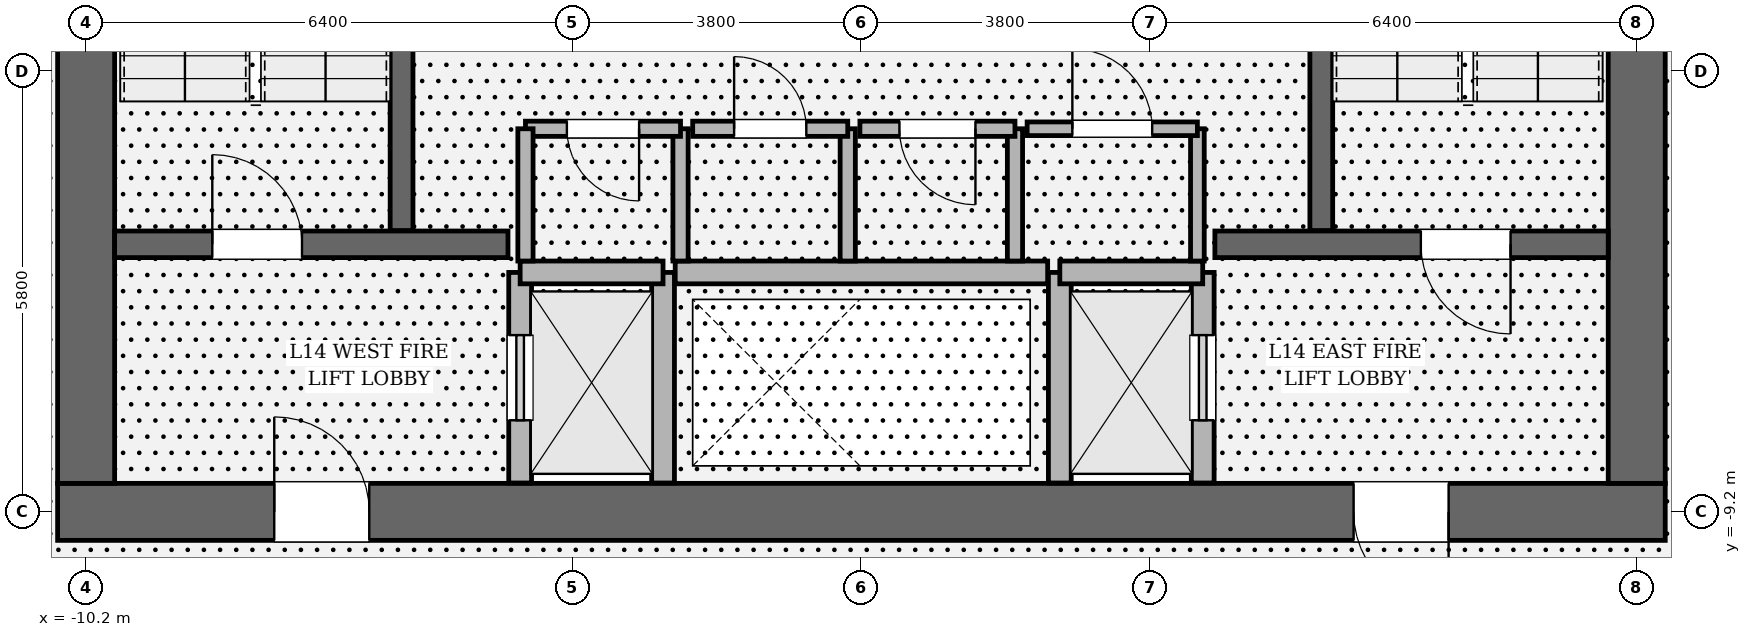
"""IFC4 building model, lengths in metres.
Left out: names, types, materials, properties, quantities, classifications, styles, units other than length and angle.
Written with IfcOpenShell. Run it as: python <this file> out.ifc"""

import sys

from ifc_helpers import new_model, si_unit, direction, frame, frame_2d, origin, place, context, subcontext, project, spatial, rectangle, extrude, element, fill, save


model = new_model("IFC4")
c1 = context("Model", 3, precision=1e-05, world=origin(), true_north=direction((0.0, 1.0)))
c2 = subcontext(c1, "Body", "Model", "MODEL_VIEW")
j1 = project(units=[si_unit("LENGTHUNIT", "METRE"), si_unit("PLANEANGLEUNIT", "RADIAN")], contexts=[c1])
p1 = place(None, origin())
s1 = spatial("IfcSite", under=j1, at=p1, CompositionType="ELEMENT")
p2 = place(p1, origin())
s2 = spatial("IfcBuilding", under=s1, at=p2, CompositionType="ELEMENT")
p3 = place(p2, frame((0.0, 0.0, 64.65)))
s3 = spatial("IfcBuildingStorey", under=s2, at=p3, CompositionType="ELEMENT", Elevation=64.65)
p4 = place(p3, frame((10.575, -9.2, 0.0), z_axis=(0.0, 0.0, 1.0), x_axis=(-1.0, 0.0, 0.0)))
e1 = element("IfcWall", 1, at=p4, inside=s3, PredefinedType="SHEAR", context=c2, shape_type="SweptSolid", body=[
    extrude(rectangle(XDim=21.15, YDim=0.75, at=frame_2d((10.575, 0.0))), origin(), (0.0, 0.0, 1.0), 4.05),
])
p5 = place(p4, frame((2.85, 0.0, 0.0)))
e2 = element("IfcOpeningElement", 2, at=p5, cuts=e1, PredefinedType="OPENING", context=c2, shape_type="SweptSolid", body=[
    extrude(rectangle(XDim=1.25, YDim=2.25, at=frame_2d((0.625, 1.125))), frame((0.0, 0.385, 0.0), z_axis=(0.0, -1.0, 0.0), x_axis=(1.0, 0.0, 0.0)), (0.0, 0.0, 1.0), 0.77),
])
p6 = place(p4, frame((17.05, 0.0, 0.0)))
e3 = element("IfcOpeningElement", 3, at=p6, cuts=e1, PredefinedType="OPENING", context=c2, shape_type="SweptSolid", body=[
    extrude(rectangle(XDim=1.25, YDim=2.25, at=frame_2d((0.625, 1.125))), frame((0.0, 0.385, 0.0), z_axis=(0.0, -1.0, 0.0), x_axis=(1.0, 0.0, 0.0)), (0.0, 0.0, 1.0), 0.77),
])
p7 = place(p3, frame((-10.2, -8.825, 0.0), z_axis=(0.0, 0.0, 1.0), x_axis=(0.0, 1.0, 0.0)))
e4 = element("IfcWall", 4, at=p7, inside=s3, PredefinedType="SHEAR", context=c2, shape_type="SweptSolid", body=[
    extrude(rectangle(XDim=17.65, YDim=0.75, at=frame_2d((8.825, 0.0))), origin(), (0.0, 0.0, 1.0), 4.05),
])
p8 = place(p7, frame((12.615, 0.0, 0.0)))
e5 = element("IfcOpeningElement", 5, at=p8, cuts=e4, PredefinedType="OPENING", context=c2, shape_type="SweptSolid", body=[
    extrude(rectangle(XDim=1.18, YDim=2.2, at=frame_2d((0.59, 1.1))), frame((0.0, 0.385, 0.0), z_axis=(0.0, -1.0, 0.0), x_axis=(1.0, 0.0, 0.0)), (0.0, 0.0, 1.0), 0.77),
])
p9 = place(p3, frame((10.2, 8.825, 0.0), z_axis=(0.0, 0.0, 1.0), x_axis=(0.0, -1.0, 0.0)))
e6 = element("IfcWall", 6, at=p9, inside=s3, PredefinedType="SHEAR", context=c2, shape_type="SweptSolid", body=[
    extrude(rectangle(XDim=17.65, YDim=0.75, at=frame_2d((8.825, 0.0))), origin(), (0.0, 0.0, 1.0), 4.05),
])
p10 = place(p9, frame((3.855, 0.0, 0.0)))
e7 = element("IfcOpeningElement", 7, at=p10, cuts=e6, PredefinedType="OPENING", context=c2, shape_type="SweptSolid", body=[
    extrude(rectangle(XDim=1.18, YDim=2.2, at=frame_2d((0.59, 1.1))), frame((0.0, 0.385, 0.0), z_axis=(0.0, -1.0, 0.0), x_axis=(1.0, 0.0, 0.0)), (0.0, 0.0, 1.0), 0.77),
])
for number, where, z_axis, x_axis in (
    (8, (-6.05, -5.5, 0.0), (0.0, 0.0, 1.0), (0.0, 1.0, 0.0)),
    (9, (6.05, 3.45, 0.0), (0.0, 0.0, 1.0), (0.0, -1.0, 0.0)),
):
    element("IfcWall", number, at=place(p3, frame(where, z_axis=z_axis, x_axis=x_axis)), inside=s3, PredefinedType="SOLIDWALL", context=c2, shape_type="SweptSolid", body=[
        extrude(rectangle(XDim=8.95, YDim=0.3, at=frame_2d((4.475, 0.0))), origin(), (0.0, 0.0, 1.0), 4.05),
    ])
p11 = place(p3, frame((-9.825, -5.68, 0.0), z_axis=(0.0, 0.0, 1.0), x_axis=(1.0, 0.0, 0.0)))
e10 = element("IfcWall", 10, at=p11, inside=s3, PredefinedType="SOLIDWALL", context=c2, shape_type="SweptSolid", body=[
    extrude(rectangle(XDim=5.175, YDim=0.35, at=frame_2d((2.587, 0.0))), origin(), (0.0, 0.0, 1.0), 4.05),
])
p12 = place(p11, frame((1.285, 0.0, 0.0)))
e11 = element("IfcOpeningElement", 11, at=p12, cuts=e10, PredefinedType="OPENING", context=c2, shape_type="SweptSolid", body=[
    extrude(rectangle(XDim=1.18, YDim=2.2, at=frame_2d((0.59, 1.1))), frame((0.0, 0.185, 0.0), z_axis=(0.0, -1.0, 0.0), x_axis=(1.0, 0.0, 0.0)), (0.0, 0.0, 1.0), 0.37),
])
p13 = place(p3, frame((4.65, -5.68, 0.0), z_axis=(0.0, 0.0, 1.0), x_axis=(1.0, 0.0, 0.0)))
e12 = element("IfcWall", 12, at=p13, inside=s3, PredefinedType="SOLIDWALL", context=c2, shape_type="SweptSolid", body=[
    extrude(rectangle(XDim=5.175, YDim=0.35, at=frame_2d((2.587, 0.0))), origin(), (0.0, 0.0, 1.0), 4.05),
])
p14 = place(p13, frame((2.71, 0.0, 0.0)))
e13 = element("IfcOpeningElement", 13, at=p14, cuts=e12, PredefinedType="OPENING", context=c2, shape_type="SweptSolid", body=[
    extrude(rectangle(XDim=1.18, YDim=2.2, at=frame_2d((0.59, 1.1))), frame((0.0, 0.185, 0.0), z_axis=(0.0, -1.0, 0.0), x_axis=(1.0, 0.0, 0.0)), (0.0, 0.0, 1.0), 0.37),
])
p15 = place(p3, frame((-4.49, -8.82, 0.0), z_axis=(0.0, 0.0, 1.0), x_axis=(0.0, 1.0, 0.0)))
e14 = element("IfcWall", 14, at=p15, inside=s3, PredefinedType="SOLIDWALL", context=c2, shape_type="SweptSolid", body=[
    extrude(rectangle(XDim=2.77, YDim=0.3, at=frame_2d((1.385, 0.0))), origin(), (0.0, 0.0, 1.0), 3.81),
])
p16 = place(p15, frame((0.825, 0.0, 0.0)))
e15 = element("IfcOpeningElement", 15, at=p16, cuts=e14, PredefinedType="OPENING", context=c2, shape_type="SweptSolid", body=[
    extrude(rectangle(XDim=1.12, YDim=2.25, at=frame_2d((0.56, 1.125))), frame((0.0, 0.16, 0.0), z_axis=(0.0, -1.0, 0.0), x_axis=(1.0, 0.0, 0.0)), (0.0, 0.0, 1.0), 0.32),
])
p17 = place(p3, frame((-2.61, -8.82, 0.0), z_axis=(0.0, 0.0, 1.0), x_axis=(0.0, 1.0, 0.0)))
e16 = element("IfcWall", 16, at=p17, inside=s3, PredefinedType="SOLIDWALL", context=c2, shape_type="SweptSolid", body=[
    extrude(rectangle(XDim=2.77, YDim=0.3, at=frame_2d((1.385, 0.0))), origin(), (0.0, 0.0, 1.0), 3.81),
])
p18 = place(p3, frame((-4.49, -6.05, 0.0), z_axis=(0.0, 0.0, 1.0), x_axis=(1.0, 0.0, 0.0)))
e17 = element("IfcWall", 17, at=p18, inside=s3, PredefinedType="SOLIDWALL", context=c2, shape_type="SweptSolid", body=[
    extrude(rectangle(XDim=1.88, YDim=0.3, at=frame_2d((0.94, 0.0))), origin(), (0.0, 0.0, 1.0), 3.81),
])
p19 = place(p3, frame((4.49, -8.82, 0.0), z_axis=(0.0, 0.0, 1.0), x_axis=(0.0, 1.0, 0.0)))
e18 = element("IfcWall", 18, at=p19, inside=s3, PredefinedType="SOLIDWALL", context=c2, shape_type="SweptSolid", body=[
    extrude(rectangle(XDim=2.77, YDim=0.3, at=frame_2d((1.385, 0.0))), origin(), (0.0, 0.0, 1.0), 3.81),
])
p20 = place(p19, frame((0.825, 0.0, 0.0)))
e19 = element("IfcOpeningElement", 19, at=p20, cuts=e18, PredefinedType="OPENING", context=c2, shape_type="SweptSolid", body=[
    extrude(rectangle(XDim=1.12, YDim=2.25, at=frame_2d((0.56, 1.125))), frame((0.0, 0.16, 0.0), z_axis=(0.0, -1.0, 0.0), x_axis=(1.0, 0.0, 0.0)), (0.0, 0.0, 1.0), 0.32),
])
p21 = place(p3, frame((2.61, -8.82, 0.0), z_axis=(0.0, 0.0, 1.0), x_axis=(0.0, 1.0, 0.0)))
e20 = element("IfcWall", 20, at=p21, inside=s3, PredefinedType="SOLIDWALL", context=c2, shape_type="SweptSolid", body=[
    extrude(rectangle(XDim=2.77, YDim=0.3, at=frame_2d((1.385, 0.0))), origin(), (0.0, 0.0, 1.0), 3.81),
])
p22 = place(p3, frame((2.61, -6.05, 0.0), z_axis=(0.0, 0.0, 1.0), x_axis=(1.0, 0.0, 0.0)))
e21 = element("IfcWall", 21, at=p22, inside=s3, PredefinedType="SOLIDWALL", context=c2, shape_type="SweptSolid", body=[
    extrude(rectangle(XDim=1.88, YDim=0.3, at=frame_2d((0.94, 0.0))), origin(), (0.0, 0.0, 1.0), 3.81),
])
p23 = place(p3, frame((-2.45, -6.05, 0.0), z_axis=(0.0, 0.0, 1.0), x_axis=(1.0, 0.0, 0.0)))
e22 = element("IfcWall", 22, at=p23, inside=s3, PredefinedType="SOLIDWALL", context=c2, shape_type="SweptSolid", body=[
    extrude(rectangle(XDim=4.9, YDim=0.3, at=frame_2d((2.45, 0.0))), origin(), (0.0, 0.0, 1.0), 3.81),
])
p24 = place(p3, frame((-2.38, -5.9, 0.0), z_axis=(0.0, 0.0, 1.0), x_axis=(0.0, 1.0, 0.0)))
e23 = element("IfcWall", 23, at=p24, inside=s3, PredefinedType="SOLIDWALL", context=c2, shape_type="SweptSolid", body=[
    extrude(rectangle(XDim=1.74, YDim=0.2, at=frame_2d((0.87, 0.0))), origin(), (0.0, 0.0, 1.0), 3.81),
])
p25 = place(p3, frame((-2.38, -4.16, 0.0), z_axis=(0.0, 0.0, 1.0), x_axis=(-1.0, 0.0, 0.0)))
e24 = element("IfcWall", 24, at=p25, inside=s3, PredefinedType="SOLIDWALL", context=c2, shape_type="SweptSolid", body=[
    extrude(rectangle(XDim=2.04, YDim=0.2, at=frame_2d((1.02, 0.0))), origin(), (0.0, 0.0, 1.0), 3.81),
])
p26 = place(p25, frame((0.545, 0.0, 0.0)))
e25 = element("IfcOpeningElement", 25, at=p26, cuts=e24, PredefinedType="OPENING", context=c2, shape_type="SweptSolid", body=[
    extrude(rectangle(XDim=0.95, YDim=2.15, at=frame_2d((0.475, 1.075))), frame((0.0, 0.11, 0.0), z_axis=(0.0, -1.0, 0.0), x_axis=(1.0, 0.0, 0.0)), (0.0, 0.0, 1.0), 0.22),
])
for number, where, z_axis, x_axis in (
    (26, (-4.42, -4.16, 0.0), (0.0, 0.0, 1.0), (0.0, -1.0, 0.0)),
    (27, (-0.18, -5.9, 0.0), (0.0, 0.0, 1.0), (0.0, 1.0, 0.0)),
):
    element("IfcWall", number, at=place(p3, frame(where, z_axis=z_axis, x_axis=x_axis)), inside=s3, PredefinedType="SOLIDWALL", context=c2, shape_type="SweptSolid", body=[
        extrude(rectangle(XDim=1.74, YDim=0.2, at=frame_2d((0.87, 0.0))), origin(), (0.0, 0.0, 1.0), 3.81),
    ])
p27 = place(p3, frame((-0.18, -4.16, 0.0), z_axis=(0.0, 0.0, 1.0), x_axis=(-1.0, 0.0, 0.0)))
e28 = element("IfcWall", 28, at=p27, inside=s3, PredefinedType="SOLIDWALL", context=c2, shape_type="SweptSolid", body=[
    extrude(rectangle(XDim=2.04, YDim=0.2, at=frame_2d((1.02, 0.0))), origin(), (0.0, 0.0, 1.0), 3.81),
])
p28 = place(p27, frame((0.545, 0.0, 0.0)))
e29 = element("IfcOpeningElement", 29, at=p28, cuts=e28, PredefinedType="OPENING", context=c2, shape_type="SweptSolid", body=[
    extrude(rectangle(XDim=0.95, YDim=2.15, at=frame_2d((0.475, 1.075))), frame((0.0, 0.11, 0.0), z_axis=(0.0, -1.0, 0.0), x_axis=(1.0, 0.0, 0.0)), (0.0, 0.0, 1.0), 0.22),
])
p29 = place(p3, frame((2.02, -5.9, 0.0), z_axis=(0.0, 0.0, 1.0), x_axis=(0.0, 1.0, 0.0)))
e30 = element("IfcWall", 30, at=p29, inside=s3, PredefinedType="SOLIDWALL", context=c2, shape_type="SweptSolid", body=[
    extrude(rectangle(XDim=1.74, YDim=0.2, at=frame_2d((0.87, 0.0))), origin(), (0.0, 0.0, 1.0), 3.81),
])
p30 = place(p3, frame((2.02, -4.16, 0.0), z_axis=(0.0, 0.0, 1.0), x_axis=(-1.0, 0.0, 0.0)))
e31 = element("IfcWall", 31, at=p30, inside=s3, PredefinedType="SOLIDWALL", context=c2, shape_type="SweptSolid", body=[
    extrude(rectangle(XDim=2.04, YDim=0.2, at=frame_2d((1.02, 0.0))), origin(), (0.0, 0.0, 1.0), 3.81),
])
p31 = place(p30, frame((0.52, 0.0, 0.0)))
e32 = element("IfcOpeningElement", 32, at=p31, cuts=e31, PredefinedType="OPENING", context=c2, shape_type="SweptSolid", body=[
    extrude(rectangle(XDim=1.0, YDim=2.15, at=frame_2d((0.5, 1.075))), frame((0.0, 0.11, 0.0), z_axis=(0.0, -1.0, 0.0), x_axis=(1.0, 0.0, 0.0)), (0.0, 0.0, 1.0), 0.22),
])
p32 = place(p3, frame((4.42, -5.9, 0.0), z_axis=(0.0, 0.0, 1.0), x_axis=(0.0, 1.0, 0.0)))
e33 = element("IfcWall", 33, at=p32, inside=s3, PredefinedType="PARTITIONING", context=c2, shape_type="SweptSolid", body=[
    extrude(rectangle(XDim=1.74, YDim=0.18, at=frame_2d((0.87, 0.0))), origin(), (0.0, 0.0, 1.0), 3.81),
])
p33 = place(p3, frame((4.42, -4.16, 0.0), z_axis=(0.0, 0.0, 1.0), x_axis=(-1.0, 0.0, 0.0)))
e34 = element("IfcWall", 34, at=p33, inside=s3, PredefinedType="PARTITIONING", context=c2, shape_type="SweptSolid", body=[
    extrude(rectangle(XDim=2.24, YDim=0.18, at=frame_2d((1.12, 0.0))), origin(), (0.0, 0.0, 1.0), 3.81),
])
p34 = place(p33, frame((0.595, 0.0, 0.0)))
e35 = element("IfcOpeningElement", 35, at=p34, cuts=e34, PredefinedType="OPENING", context=c2, shape_type="SweptSolid", body=[
    extrude(rectangle(XDim=1.05, YDim=2.2, at=frame_2d((0.525, 1.1))), frame((0.0, 0.1, 0.0), z_axis=(0.0, -1.0, 0.0), x_axis=(1.0, 0.0, 0.0)), (0.0, 0.0, 1.0), 0.2),
])
p35 = place(p12, origin())
e36 = element("IfcDoor", 36, at=p35, inside=s3, OperationType="SINGLE_SWING_LEFT", PredefinedType="DOOR", context=c2, shape_type="SweptSolid", body=[
    extrude(rectangle(XDim=1.18, YDim=2.2, at=frame_2d((0.59, 1.1))), frame((0.0, 0.025, 0.0), z_axis=(0.0, -1.0, 0.0), x_axis=(1.0, 0.0, 0.0)), (0.0, 0.0, 1.0), 0.05),
])
fill(e11, e36)
p36 = place(p14, origin())
e37 = element("IfcDoor", 37, at=p36, inside=s3, OperationType="SINGLE_SWING_RIGHT", PredefinedType="DOOR", context=c2, shape_type="SweptSolid", body=[
    extrude(rectangle(XDim=1.18, YDim=2.2, at=frame_2d((0.59, 1.1))), frame((0.0, 0.025, 0.0), z_axis=(0.0, -1.0, 0.0), x_axis=(1.0, 0.0, 0.0)), (0.0, 0.0, 1.0), 0.05),
])
fill(e13, e37)
p37 = place(p5, origin())
e38 = element("IfcDoor", 38, at=p37, inside=s3, OperationType="SINGLE_SWING_LEFT", PredefinedType="DOOR", context=c2, shape_type="SweptSolid", body=[
    extrude(rectangle(XDim=1.25, YDim=2.25, at=frame_2d((0.625, 1.125))), frame((0.0, 0.025, 0.0), z_axis=(0.0, -1.0, 0.0), x_axis=(1.0, 0.0, 0.0)), (0.0, 0.0, 1.0), 0.05),
])
fill(e2, e38)
p38 = place(p6, origin())
e39 = element("IfcDoor", 39, at=p38, inside=s3, OperationType="SINGLE_SWING_RIGHT", PredefinedType="DOOR", context=c2, shape_type="SweptSolid", body=[
    extrude(rectangle(XDim=1.25, YDim=2.25, at=frame_2d((0.625, 1.125))), frame((0.0, 0.025, 0.0), z_axis=(0.0, -1.0, 0.0), x_axis=(1.0, 0.0, 0.0)), (0.0, 0.0, 1.0), 0.05),
])
fill(e3, e39)
p39 = place(p16, origin())
e40 = element("IfcDoor", 40, at=p39, inside=s3, OperationType="SLIDING_TO_LEFT", PredefinedType="DOOR", context=c2, shape_type="SweptSolid", body=[
    extrude(rectangle(XDim=1.12, YDim=2.25, at=frame_2d((0.56, 1.125))), frame((0.0, 0.025, 0.0), z_axis=(0.0, -1.0, 0.0), x_axis=(1.0, 0.0, 0.0)), (0.0, 0.0, 1.0), 0.05),
])
fill(e15, e40)
p40 = place(p20, origin())
e41 = element("IfcDoor", 41, at=p40, inside=s3, OperationType="SLIDING_TO_RIGHT", PredefinedType="DOOR", context=c2, shape_type="SweptSolid", body=[
    extrude(rectangle(XDim=1.12, YDim=2.25, at=frame_2d((0.56, 1.125))), frame((0.0, 0.025, 0.0), z_axis=(0.0, -1.0, 0.0), x_axis=(1.0, 0.0, 0.0)), (0.0, 0.0, 1.0), 0.05),
])
fill(e19, e41)
p41 = place(p26, origin())
e42 = element("IfcDoor", 42, at=p41, inside=s3, OperationType="SINGLE_SWING_LEFT", PredefinedType="DOOR", context=c2, shape_type="SweptSolid", body=[
    extrude(rectangle(XDim=0.95, YDim=2.15, at=frame_2d((0.475, 1.075))), frame((0.0, 0.025, 0.0), z_axis=(0.0, -1.0, 0.0), x_axis=(1.0, 0.0, 0.0)), (0.0, 0.0, 1.0), 0.05),
])
fill(e25, e42)
p42 = place(p28, origin())
e43 = element("IfcDoor", 43, at=p42, inside=s3, OperationType="SINGLE_SWING_RIGHT", PredefinedType="DOOR", context=c2, shape_type="SweptSolid", body=[
    extrude(rectangle(XDim=0.95, YDim=2.15, at=frame_2d((0.475, 1.075))), frame((0.0, 0.025, 0.0), z_axis=(0.0, -1.0, 0.0), x_axis=(1.0, 0.0, 0.0)), (0.0, 0.0, 1.0), 0.05),
])
fill(e29, e43)
p43 = place(p31, origin())
e44 = element("IfcDoor", 44, at=p43, inside=s3, OperationType="SINGLE_SWING_LEFT", PredefinedType="DOOR", context=c2, shape_type="SweptSolid", body=[
    extrude(rectangle(XDim=1.0, YDim=2.15, at=frame_2d((0.5, 1.075))), frame((0.0, 0.025, 0.0), z_axis=(0.0, -1.0, 0.0), x_axis=(1.0, 0.0, 0.0)), (0.0, 0.0, 1.0), 0.05),
])
fill(e32, e44)
p44 = place(p34, origin())
e45 = element("IfcDoor", 45, at=p44, inside=s3, OperationType="SINGLE_SWING_RIGHT", PredefinedType="DOOR", context=c2, shape_type="SweptSolid", body=[
    extrude(rectangle(XDim=1.05, YDim=2.2, at=frame_2d((0.525, 1.1))), frame((0.0, 0.025, 0.0), z_axis=(0.0, -1.0, 0.0), x_axis=(1.0, 0.0, 0.0)), (0.0, 0.0, 1.0), 0.05),
])
fill(e35, e45)
save(model, sys.argv[1])
